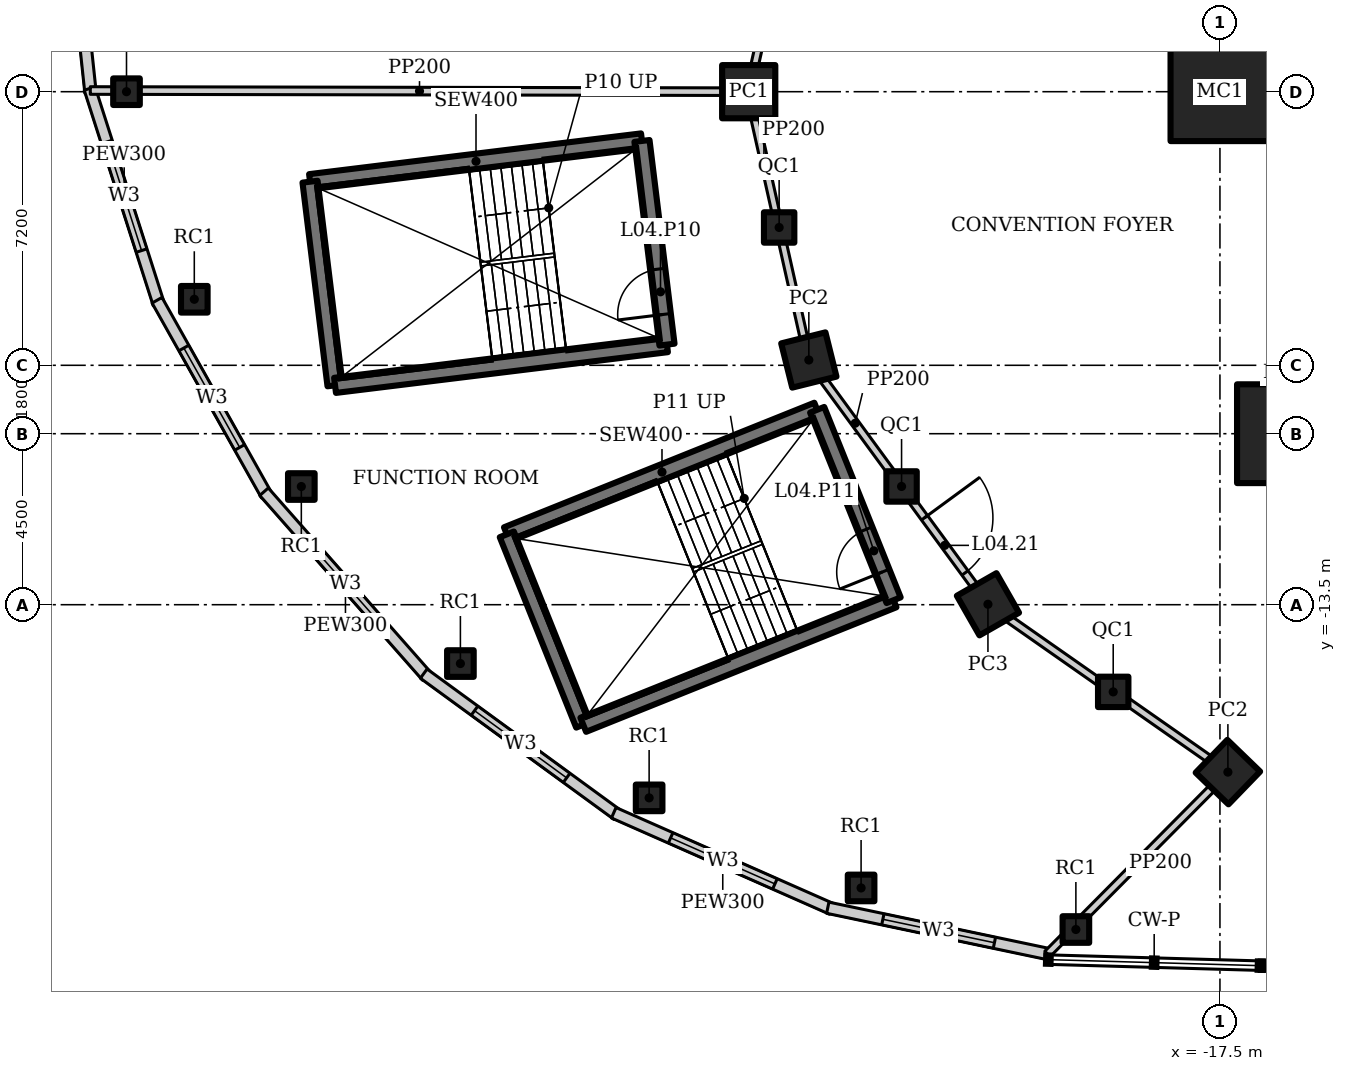
"""IFC4 building model, lengths in metres.
Left out: names, types, materials, properties, quantities, classifications, styles, units other than length and angle.
Written with IfcOpenShell. Run it as: python <this file> out.ifc"""

import sys

from ifc_helpers import new_model, si_unit, direction, frame, frame_2d, origin, origin_2d, place, context, subcontext, project, spatial, rectangle, hollow_rectangle, extrude, element, fill, save


model = new_model("IFC4")
c1 = context("Model", 3, precision=1e-05, world=origin(), true_north=direction((0.0, 1.0)))
c2 = subcontext(c1, "Body", "Model", "MODEL_VIEW")
j1 = project(units=[si_unit("LENGTHUNIT", "METRE"), si_unit("PLANEANGLEUNIT", "RADIAN")], contexts=[c1])
p1 = place(None, origin())
s1 = spatial("IfcSite", under=j1, at=p1, CompositionType="ELEMENT")
p2 = place(p1, origin())
s2 = spatial("IfcBuilding", under=s1, at=p2, CompositionType="ELEMENT")
p3 = place(p2, frame((0.0, 0.0, 27.0)))
s3 = spatial("IfcBuildingStorey", under=s2, at=p3, CompositionType="ELEMENT", Elevation=27.0)
for number, where, z_axis, x_axis in (
    (1, (-17.5, 0.0, 0.0), (0.0, 0.0, 1.0), (1.0, 0.0, 0.0)),
    (2, (-15.75, -9.0, 0.0), (0.0, 0.0, 1.0), (1.0, 0.0, 0.0)),
):
    element("IfcColumn", number, at=place(p3, frame(where, z_axis=z_axis, x_axis=x_axis)), inside=s3, PredefinedType="COLUMN", context=c2, shape_type="SweptSolid", body=[
        extrude(hollow_rectangle(XDim=2.6, YDim=2.6, WallThickness=0.13, at=origin_2d()), origin(), (0.0, 0.0, 1.0), 5.0),
    ])
p4 = place(p3, frame((-29.9, 0.0, 0.0), z_axis=(0.0, 0.0, 1.0), x_axis=(1.0, 0.0, 0.0)))
e3 = element("IfcColumn", 3, at=p4, inside=s3, PredefinedType="COLUMN", context=c2, shape_type="SweptSolid", body=[
    extrude(hollow_rectangle(XDim=1.4, YDim=1.4, WallThickness=0.1, at=origin_2d()), origin(), (0.0, 0.0, 1.0), 5.0),
])
p5 = place(p3, frame((-28.318, -7.06, 0.0), z_axis=(0.0, 0.0, 1.0), x_axis=(0.970295726276, 0.2419218956, 0.0)))
e4 = element("IfcColumn", 4, at=p5, inside=s3, PredefinedType="COLUMN", context=c2, shape_type="SweptSolid", body=[
    extrude(hollow_rectangle(XDim=1.2, YDim=1.2, WallThickness=0.1, at=origin_2d()), origin(), (0.0, 0.0, 1.0), 5.0),
])
p6 = place(p3, frame((-23.605, -13.489, 0.0), z_axis=(0.0, 0.0, 1.0), x_axis=(0.86824298017, 0.496139221777, 0.0)))
e5 = element("IfcColumn", 5, at=p6, inside=s3, PredefinedType="COLUMN", context=c2, shape_type="SweptSolid", body=[
    extrude(hollow_rectangle(XDim=1.2, YDim=1.2, WallThickness=0.12, at=origin_2d()), origin(), (0.0, 0.0, 1.0), 5.0),
])
p7 = place(p3, frame((-17.291, -17.905, 0.0), z_axis=(0.0, 0.0, 1.0), x_axis=(0.694658370459, 0.719339800339, 0.0)))
e6 = element("IfcColumn", 6, at=p7, inside=s3, PredefinedType="COLUMN", context=c2, shape_type="SweptSolid", body=[
    extrude(hollow_rectangle(XDim=1.2, YDim=1.2, WallThickness=0.1, at=origin_2d()), origin(), (0.0, 0.0, 1.0), 5.0),
])
for number, where, z_axis, x_axis in (
    (7, (-29.099, -3.573, 0.0), (0.0, 0.0, 1.0), (1.0, 0.0, 0.0)),
    (8, (-25.878, -10.388, 0.0), (0.0, 0.0, 1.0), (1.0, 0.0, 0.0)),
    (9, (-20.309, -15.794, 0.0), (0.0, 0.0, 1.0), (1.0, 0.0, 0.0)),
):
    element("IfcColumn", number, at=place(p3, frame(where, z_axis=z_axis, x_axis=x_axis)), inside=s3, PredefinedType="COLUMN", context=c2, shape_type="SweptSolid", body=[
        extrude(hollow_rectangle(XDim=0.8, YDim=0.8, WallThickness=0.05, at=origin_2d()), origin(), (0.0, 0.0, 1.0), 4.8),
    ])
for number, where, z_axis, x_axis in (
    (10, (-44.489, -5.462, 0.0), (0.0, 0.0, 1.0), (1.0, 0.0, 0.0)),
    (11, (-37.487, -15.049, 0.0), (0.0, 0.0, 1.0), (1.0, 0.0, 0.0)),
    (12, (-26.943, -20.954, 0.0), (0.0, 0.0, 1.0), (1.0, 0.0, 0.0)),
    (13, (-46.272, 0.0, 0.0), (0.0, 0.0, 1.0), (1.0, 0.0, 0.0)),
    (14, (-41.672, -10.39, 0.0), (0.0, 0.0, 1.0), (1.0, 0.0, 0.0)),
    (15, (-32.521, -18.583, 0.0), (0.0, 0.0, 1.0), (1.0, 0.0, 0.0)),
    (16, (-21.291, -22.047, 0.0), (0.0, 0.0, 1.0), (1.0, 0.0, 0.0)),
):
    element("IfcColumn", number, at=place(p3, frame(where, z_axis=z_axis, x_axis=x_axis)), inside=s3, PredefinedType="COLUMN", context=c2, shape_type="SweptSolid", body=[
        extrude(hollow_rectangle(XDim=0.7, YDim=0.7, WallThickness=0.04, at=origin_2d()), origin(), (0.0, 0.0, 1.0), 4.8),
    ])
p8 = place(p3, frame((-47.855, 5.949, 0.0), z_axis=(0.0, 0.0, 1.0), x_axis=(0.105835648981, -0.99438363593, 0.0)))
e17 = element("IfcWall", 17, at=p8, inside=s3, PredefinedType="SOLIDWALL", context=c2, shape_type="SweptSolid", body=[
    extrude(rectangle(XDim=6.007, YDim=0.3, at=frame_2d((3.003, 0.0))), origin(), (0.0, 0.0, 1.0), 4.8),
])
p9 = place(p8, frame((1.503, 0.0, 0.9)))
e18 = element("IfcOpeningElement", 18, at=p9, cuts=e17, PredefinedType="OPENING", context=c2, shape_type="SweptSolid", body=[
    extrude(rectangle(XDim=3.0, YDim=2.0, at=frame_2d((1.5, 1.0))), frame((0.0, 0.16, 0.0), z_axis=(0.0, -1.0, 0.0), x_axis=(1.0, 0.0, 0.0)), (0.0, 0.0, 1.0), 0.32),
])
p10 = place(p3, frame((-47.242, 0.084, 0.0), z_axis=(0.0, 0.0, 1.0), x_axis=(0.304991367091, -0.95235511549, 0.0)))
e19 = element("IfcWall", 19, at=p10, inside=s3, PredefinedType="SOLIDWALL", context=c2, shape_type="SweptSolid", body=[
    extrude(rectangle(XDim=5.956, YDim=0.3, at=frame_2d((2.978, 0.0))), origin(), (0.0, 0.0, 1.0), 4.8),
])
p11 = place(p10, frame((1.478, 0.0, 0.9)))
e20 = element("IfcOpeningElement", 20, at=p11, cuts=e19, PredefinedType="OPENING", context=c2, shape_type="SweptSolid", body=[
    extrude(rectangle(XDim=3.0, YDim=2.0, at=frame_2d((1.5, 1.0))), frame((0.0, 0.16, 0.0), z_axis=(0.0, -1.0, 0.0), x_axis=(1.0, 0.0, 0.0)), (0.0, 0.0, 1.0), 0.32),
])
p12 = place(p3, frame((-45.469, -5.488, 0.0), z_axis=(0.0, 0.0, 1.0), x_axis=(0.489563544979, -0.871967622924, 0.0)))
e21 = element("IfcWall", 21, at=p12, inside=s3, PredefinedType="SOLIDWALL", context=c2, shape_type="SweptSolid", body=[
    extrude(rectangle(XDim=5.883, YDim=0.3, at=frame_2d((2.941, 0.0))), origin(), (0.0, 0.0, 1.0), 4.8),
])
p13 = place(p12, frame((1.441, 0.0, 0.9)))
e22 = element("IfcOpeningElement", 22, at=p13, cuts=e21, PredefinedType="OPENING", context=c2, shape_type="SweptSolid", body=[
    extrude(rectangle(XDim=3.0, YDim=2.0, at=frame_2d((1.5, 1.0))), frame((0.0, 0.16, 0.0), z_axis=(0.0, -1.0, 0.0), x_axis=(1.0, 0.0, 0.0)), (0.0, 0.0, 1.0), 0.32),
])
p14 = place(p3, frame((-42.654, -10.527, 0.0), z_axis=(0.0, 0.0, 1.0), x_axis=(0.661196672464, -0.75021261008, 0.0)))
e23 = element("IfcWall", 23, at=p14, inside=s3, PredefinedType="SOLIDWALL", context=c2, shape_type="SweptSolid", body=[
    extrude(rectangle(XDim=6.481, YDim=0.3, at=frame_2d((3.24, 0.0))), origin(), (0.0, 0.0, 1.0), 4.8),
])
p15 = place(p14, frame((1.74, 0.0, 0.9)))
e24 = element("IfcOpeningElement", 24, at=p15, cuts=e23, PredefinedType="OPENING", context=c2, shape_type="SweptSolid", body=[
    extrude(rectangle(XDim=3.0, YDim=2.0, at=frame_2d((1.5, 1.0))), frame((0.0, 0.16, 0.0), z_axis=(0.0, -1.0, 0.0), x_axis=(1.0, 0.0, 0.0)), (0.0, 0.0, 1.0), 0.32),
])
p16 = place(p3, frame((-38.451, -15.314, 0.0), z_axis=(0.0, 0.0, 1.0), x_axis=(0.807903497184, -0.589314804868, 0.0)))
e25 = element("IfcWall", 25, at=p16, inside=s3, PredefinedType="SOLIDWALL", context=c2, shape_type="SweptSolid", body=[
    extrude(rectangle(XDim=6.308, YDim=0.3, at=frame_2d((3.154, 0.0))), origin(), (0.0, 0.0, 1.0), 4.8),
])
p17 = place(p16, frame((1.654, 0.0, 0.9)))
e26 = element("IfcOpeningElement", 26, at=p17, cuts=e25, PredefinedType="OPENING", context=c2, shape_type="SweptSolid", body=[
    extrude(rectangle(XDim=3.0, YDim=2.0, at=frame_2d((1.5, 1.0))), frame((0.0, 0.16, 0.0), z_axis=(0.0, -1.0, 0.0), x_axis=(1.0, 0.0, 0.0)), (0.0, 0.0, 1.0), 0.32),
])
p18 = place(p3, frame((-33.451, -18.976, 0.0), z_axis=(0.0, 0.0, 1.0), x_axis=(0.914840828207, -0.40381463451, 0.0)))
e27 = element("IfcWall", 27, at=p18, inside=s3, PredefinedType="SOLIDWALL", context=c2, shape_type="SweptSolid", body=[
    extrude(rectangle(XDim=6.271, YDim=0.3, at=frame_2d((3.136, 0.0))), origin(), (0.0, 0.0, 1.0), 4.8),
])
p19 = place(p18, frame((1.636, 0.0, 0.9)))
e28 = element("IfcOpeningElement", 28, at=p19, cuts=e27, PredefinedType="OPENING", context=c2, shape_type="SweptSolid", body=[
    extrude(rectangle(XDim=3.0, YDim=2.0, at=frame_2d((1.5, 1.0))), frame((0.0, 0.16, 0.0), z_axis=(0.0, -1.0, 0.0), x_axis=(1.0, 0.0, 0.0)), (0.0, 0.0, 1.0), 0.32),
])
p20 = place(p3, frame((-27.82, -21.474, 0.0), z_axis=(0.0, 0.0, 1.0), x_axis=(0.978625319268, -0.205651366364, 0.0)))
e29 = element("IfcWall", 29, at=p20, inside=s3, PredefinedType="SOLIDWALL", context=c2, shape_type="SweptSolid", body=[
    extrude(rectangle(XDim=5.962, YDim=0.3, at=frame_2d((2.981, 0.0))), origin(), (0.0, 0.0, 1.0), 4.8),
])
p21 = place(p20, frame((1.481, 0.0, 0.9)))
e30 = element("IfcOpeningElement", 30, at=p21, cuts=e29, PredefinedType="OPENING", context=c2, shape_type="SweptSolid", body=[
    extrude(rectangle(XDim=3.0, YDim=2.0, at=frame_2d((1.5, 1.0))), frame((0.0, 0.16, 0.0), z_axis=(0.0, -1.0, 0.0), x_axis=(1.0, 0.0, 0.0)), (0.0, 0.0, 1.0), 0.32),
])
p22 = place(p3, frame((-29.099, 3.573, 0.0), z_axis=(0.0, 0.0, 1.0), x_axis=(-0.218631550323, -0.975807483679, 0.0)))
e31 = element("IfcWall", 31, at=p22, inside=s3, PredefinedType="SOLIDWALL", context=c2, shape_type="SweptSolid", body=[
    extrude(rectangle(XDim=3.662, YDim=0.2, at=frame_2d((1.831, 0.0))), origin(), (0.0, 0.0, 1.0), 4.272),
])
p23 = place(p3, frame((-29.9, 0.0, 0.0), z_axis=(0.0, 0.0, 1.0), x_axis=(0.218631550323, -0.975807483679, 0.0)))
e32 = element("IfcWall", 32, at=p23, inside=s3, PredefinedType="SOLIDWALL", context=c2, shape_type="SweptSolid", body=[
    extrude(rectangle(XDim=3.662, YDim=0.2, at=frame_2d((1.831, 0.0))), origin(), (0.0, 0.0, 1.0), 4.394),
])
p24 = place(p3, frame((-29.099, -3.573, 0.0), z_axis=(0.0, 0.0, 1.0), x_axis=(0.218673326171, -0.97579812278, 0.0)))
e33 = element("IfcWall", 33, at=p24, inside=s3, PredefinedType="SOLIDWALL", context=c2, shape_type="SweptSolid", body=[
    extrude(rectangle(XDim=3.574, YDim=0.2, at=frame_2d((1.787, 0.0))), origin(), (0.0, 0.0, 1.0), 4.396),
])
p25 = place(p3, frame((-28.318, -7.06, 0.0), z_axis=(0.0, 0.0, 1.0), x_axis=(0.591255937291, -0.806483984105, 0.0)))
e34 = element("IfcWall", 34, at=p25, inside=s3, PredefinedType="SOLIDWALL", context=c2, shape_type="SweptSolid", body=[
    extrude(rectangle(XDim=4.127, YDim=0.2, at=frame_2d((2.063, 0.0))), origin(), (0.0, 0.0, 1.0), 2.8),
])
p26 = place(p3, frame((-25.878, -10.388, 0.0), z_axis=(0.0, 0.0, 1.0), x_axis=(0.591286566758, -0.806461527893, 0.0)))
e35 = element("IfcWall", 35, at=p26, inside=s3, PredefinedType="SOLIDWALL", context=c2, shape_type="SweptSolid", body=[
    extrude(rectangle(XDim=3.844, YDim=0.2, at=frame_2d((1.922, 0.0))), origin(), (0.0, 0.0, 1.0), 4.396),
])
p27 = place(p26, frame((1.022, 0.0, 0.0)))
e36 = element("IfcOpeningElement", 36, at=p27, cuts=e35, PredefinedType="OPENING", context=c2, shape_type="SweptSolid", body=[
    extrude(rectangle(XDim=1.8, YDim=2.4, at=frame_2d((0.9, 1.2))), frame((0.0, 0.11, 0.0), z_axis=(0.0, -1.0, 0.0), x_axis=(1.0, 0.0, 0.0)), (0.0, 0.0, 1.0), 0.22),
])
p28 = place(p3, frame((-23.605, -13.489, 0.0), z_axis=(0.0, 0.0, 1.0), x_axis=(0.819442856133, -0.573160889744, 0.0)))
e37 = element("IfcWall", 37, at=p28, inside=s3, PredefinedType="SOLIDWALL", context=c2, shape_type="SweptSolid", body=[
    extrude(rectangle(XDim=4.023, YDim=0.2, at=frame_2d((2.011, 0.0))), origin(), (0.0, 0.0, 1.0), 2.8),
])
p29 = place(p3, frame((-20.309, -15.794, 0.0), z_axis=(0.0, 0.0, 1.0), x_axis=(0.819409395821, -0.573208724672, 0.0)))
e38 = element("IfcWall", 38, at=p29, inside=s3, PredefinedType="SOLIDWALL", context=c2, shape_type="SweptSolid", body=[
    extrude(rectangle(XDim=3.683, YDim=0.2, at=frame_2d((1.841, 0.0))), origin(), (0.0, 0.0, 1.0), 4.338),
])
p30 = place(p3, frame((-29.9, 0.0, 0.0), z_axis=(0.0, 0.0, 1.0), x_axis=(-0.99999837328, 0.001803728535, 0.0)))
e39 = element("IfcWall", 39, at=p30, inside=s3, PredefinedType="SOLIDWALL", context=c2, shape_type="SweptSolid", body=[
    extrude(rectangle(XDim=17.325, YDim=0.2, at=frame_2d((8.663, 0.0))), origin(), (0.0, 0.0, 1.0), 2.8),
])
p31 = place(p3, frame((-17.291, -17.905, 0.0), z_axis=(0.0, 0.0, 1.0), x_axis=(-0.704348079756, -0.709854761585, 0.0)))
e40 = element("IfcWall", 40, at=p31, inside=s3, PredefinedType="SOLIDWALL", context=c2, shape_type="SweptSolid", body=[
    extrude(rectangle(XDim=6.739, YDim=0.2, at=frame_2d((3.37, 0.0))), origin(), (0.0, 0.0, 1.0), 4.198),
])
p32 = place(p3, frame((-32.708, -1.296, 0.0), z_axis=(0.0, 0.0, 1.0), x_axis=(-0.992545692684, -0.121873081252, 0.0)))
e41 = element("IfcWall", 41, at=p32, inside=s3, PredefinedType="SHEAR", context=c2, shape_type="SweptSolid", body=[
    extrude(rectangle(XDim=8.8, YDim=0.4, at=frame_2d((4.4, 0.0))), origin(), (0.0, 0.0, 1.0), 5.0),
])
p33 = place(p3, frame((-41.443, -2.368, 0.0), z_axis=(0.0, 0.0, 1.0), x_axis=(0.121892082937, -0.992543359314, 0.0)))
e42 = element("IfcWall", 42, at=p33, inside=s3, PredefinedType="SHEAR", context=c2, shape_type="SweptSolid", body=[
    extrude(rectangle(XDim=5.4, YDim=0.4, at=frame_2d((2.7, 0.0))), origin(), (0.0, 0.0, 1.0), 5.0),
])
p34 = place(p3, frame((-40.785, -7.728, 0.0), z_axis=(0.0, 0.0, 1.0), x_axis=(0.992545280606, 0.121876437212, 0.0)))
e43 = element("IfcWall", 43, at=p34, inside=s3, PredefinedType="SHEAR", context=c2, shape_type="SweptSolid", body=[
    extrude(rectangle(XDim=8.8, YDim=0.4, at=frame_2d((4.4, 0.0))), origin(), (0.0, 0.0, 1.0), 5.0),
])
p35 = place(p3, frame((-32.051, -6.656, 0.0), z_axis=(0.0, 0.0, 1.0), x_axis=(-0.12184754212, 0.99254882826, 0.0)))
e44 = element("IfcWall", 44, at=p35, inside=s3, PredefinedType="SHEAR", context=c2, shape_type="SweptSolid", body=[
    extrude(rectangle(XDim=5.4, YDim=0.4, at=frame_2d((2.7, 0.0))), origin(), (0.0, 0.0, 1.0), 5.0),
])
p36 = place(p35, frame((0.8, 0.0, 0.0)))
e45 = element("IfcOpeningElement", 45, at=p36, cuts=e44, PredefinedType="OPENING", context=c2, shape_type="SweptSolid", body=[
    extrude(rectangle(XDim=1.2, YDim=2.1, at=frame_2d((0.6, 1.05))), frame((0.0, 0.21, 0.0), z_axis=(0.0, -1.0, 0.0), x_axis=(1.0, 0.0, 0.0)), (0.0, 0.0, 1.0), 0.42),
])
p37 = place(p3, frame((-28.099, -8.371, 0.0), z_axis=(0.0, 0.0, 1.0), x_axis=(-0.92801678004, -0.372538395288, 0.0)))
e46 = element("IfcWall", 46, at=p37, inside=s3, PredefinedType="SHEAR", context=c2, shape_type="SweptSolid", body=[
    extrude(rectangle(XDim=8.8, YDim=0.4, at=frame_2d((4.4, 0.0))), origin(), (0.0, 0.0, 1.0), 5.0),
])
p38 = place(p3, frame((-36.265, -11.649, 0.0), z_axis=(0.0, 0.0, 1.0), x_axis=(0.372544066459, -0.928014503414, 0.0)))
e47 = element("IfcWall", 47, at=p38, inside=s3, PredefinedType="SHEAR", context=c2, shape_type="SweptSolid", body=[
    extrude(rectangle(XDim=5.4, YDim=0.4, at=frame_2d((2.7, 0.0))), origin(), (0.0, 0.0, 1.0), 5.0),
])
p39 = place(p3, frame((-34.253, -16.66, 0.0), z_axis=(0.0, 0.0, 1.0), x_axis=(0.92801678004, 0.372538395288, 0.0)))
e48 = element("IfcWall", 48, at=p39, inside=s3, PredefinedType="SHEAR", context=c2, shape_type="SweptSolid", body=[
    extrude(rectangle(XDim=8.8, YDim=0.4, at=frame_2d((4.4, 0.0))), origin(), (0.0, 0.0, 1.0), 5.0),
])
p40 = place(p3, frame((-26.087, -13.382, 0.0), z_axis=(0.0, 0.0, 1.0), x_axis=(-0.372544066459, 0.928014503414, 0.0)))
e49 = element("IfcWall", 49, at=p40, inside=s3, PredefinedType="SHEAR", context=c2, shape_type="SweptSolid", body=[
    extrude(rectangle(XDim=5.4, YDim=0.4, at=frame_2d((2.7, 0.0))), origin(), (0.0, 0.0, 1.0), 5.0),
])
p41 = place(p40, frame((0.8, 0.0, 0.0)))
e50 = element("IfcOpeningElement", 50, at=p41, cuts=e49, PredefinedType="OPENING", context=c2, shape_type="SweptSolid", body=[
    extrude(rectangle(XDim=1.2, YDim=2.1, at=frame_2d((0.6, 1.05))), frame((0.0, 0.21, 0.0), z_axis=(0.0, -1.0, 0.0), x_axis=(1.0, 0.0, 0.0)), (0.0, 0.0, 1.0), 0.42),
])
p42 = place(p11, origin())
e51 = element("IfcWindow", 51, at=p42, inside=s3, PartitioningType="SINGLE_PANEL", PredefinedType="WINDOW", context=c2, shape_type="SweptSolid", body=[
    extrude(rectangle(XDim=3.0, YDim=2.0, at=frame_2d((1.5, 1.0))), frame((0.0, 0.03, 0.0), z_axis=(0.0, -1.0, 0.0), x_axis=(1.0, 0.0, 0.0)), (0.0, 0.0, 1.0), 0.06),
])
fill(e20, e51)
p43 = place(p13, origin())
e52 = element("IfcWindow", 52, at=p43, inside=s3, PartitioningType="SINGLE_PANEL", PredefinedType="WINDOW", context=c2, shape_type="SweptSolid", body=[
    extrude(rectangle(XDim=3.0, YDim=2.0, at=frame_2d((1.5, 1.0))), frame((0.0, 0.03, 0.0), z_axis=(0.0, -1.0, 0.0), x_axis=(1.0, 0.0, 0.0)), (0.0, 0.0, 1.0), 0.06),
])
fill(e22, e52)
p44 = place(p15, origin())
e53 = element("IfcWindow", 53, at=p44, inside=s3, PartitioningType="SINGLE_PANEL", PredefinedType="WINDOW", context=c2, shape_type="SweptSolid", body=[
    extrude(rectangle(XDim=3.0, YDim=2.0, at=frame_2d((1.5, 1.0))), frame((0.0, 0.03, 0.0), z_axis=(0.0, -1.0, 0.0), x_axis=(1.0, 0.0, 0.0)), (0.0, 0.0, 1.0), 0.06),
])
fill(e24, e53)
p45 = place(p17, origin())
e54 = element("IfcWindow", 54, at=p45, inside=s3, PartitioningType="SINGLE_PANEL", PredefinedType="WINDOW", context=c2, shape_type="SweptSolid", body=[
    extrude(rectangle(XDim=3.0, YDim=2.0, at=frame_2d((1.5, 1.0))), frame((0.0, 0.03, 0.0), z_axis=(0.0, -1.0, 0.0), x_axis=(1.0, 0.0, 0.0)), (0.0, 0.0, 1.0), 0.06),
])
fill(e26, e54)
p46 = place(p19, origin())
e55 = element("IfcWindow", 55, at=p46, inside=s3, PartitioningType="SINGLE_PANEL", PredefinedType="WINDOW", context=c2, shape_type="SweptSolid", body=[
    extrude(rectangle(XDim=3.0, YDim=2.0, at=frame_2d((1.5, 1.0))), frame((0.0, 0.03, 0.0), z_axis=(0.0, -1.0, 0.0), x_axis=(1.0, 0.0, 0.0)), (0.0, 0.0, 1.0), 0.06),
])
fill(e28, e55)
p47 = place(p21, origin())
e56 = element("IfcWindow", 56, at=p47, inside=s3, PartitioningType="SINGLE_PANEL", PredefinedType="WINDOW", context=c2, shape_type="SweptSolid", body=[
    extrude(rectangle(XDim=3.0, YDim=2.0, at=frame_2d((1.5, 1.0))), frame((0.0, 0.03, 0.0), z_axis=(0.0, -1.0, 0.0), x_axis=(1.0, 0.0, 0.0)), (0.0, 0.0, 1.0), 0.06),
])
fill(e30, e56)
p48 = place(p27, origin())
e57 = element("IfcDoor", 57, at=p48, inside=s3, OperationType="DOUBLE_DOOR_DOUBLE_SWING", PredefinedType="DOOR", context=c2, shape_type="SweptSolid", body=[
    extrude(rectangle(XDim=1.8, YDim=2.4, at=frame_2d((0.9, 1.2))), frame((0.0, 0.025, 0.0), z_axis=(0.0, -1.0, 0.0), x_axis=(1.0, 0.0, 0.0)), (0.0, 0.0, 1.0), 0.05),
])
fill(e36, e57)
p49 = place(p36, origin())
e58 = element("IfcDoor", 58, at=p49, inside=s3, OperationType="SINGLE_SWING_RIGHT", PredefinedType="DOOR", context=c2, shape_type="SweptSolid", body=[
    extrude(rectangle(XDim=1.2, YDim=2.1, at=frame_2d((0.6, 1.05))), frame((0.0, 0.025, 0.0), z_axis=(0.0, -1.0, 0.0), x_axis=(1.0, 0.0, 0.0)), (0.0, 0.0, 1.0), 0.05),
])
fill(e45, e58)
p50 = place(p41, origin())
e59 = element("IfcDoor", 59, at=p50, inside=s3, OperationType="SINGLE_SWING_RIGHT", PredefinedType="DOOR", context=c2, shape_type="SweptSolid", body=[
    extrude(rectangle(XDim=1.2, YDim=2.1, at=frame_2d((0.6, 1.05))), frame((0.0, 0.025, 0.0), z_axis=(0.0, -1.0, 0.0), x_axis=(1.0, 0.0, 0.0)), (0.0, 0.0, 1.0), 0.05),
])
fill(e50, e59)
save(model, sys.argv[1])
